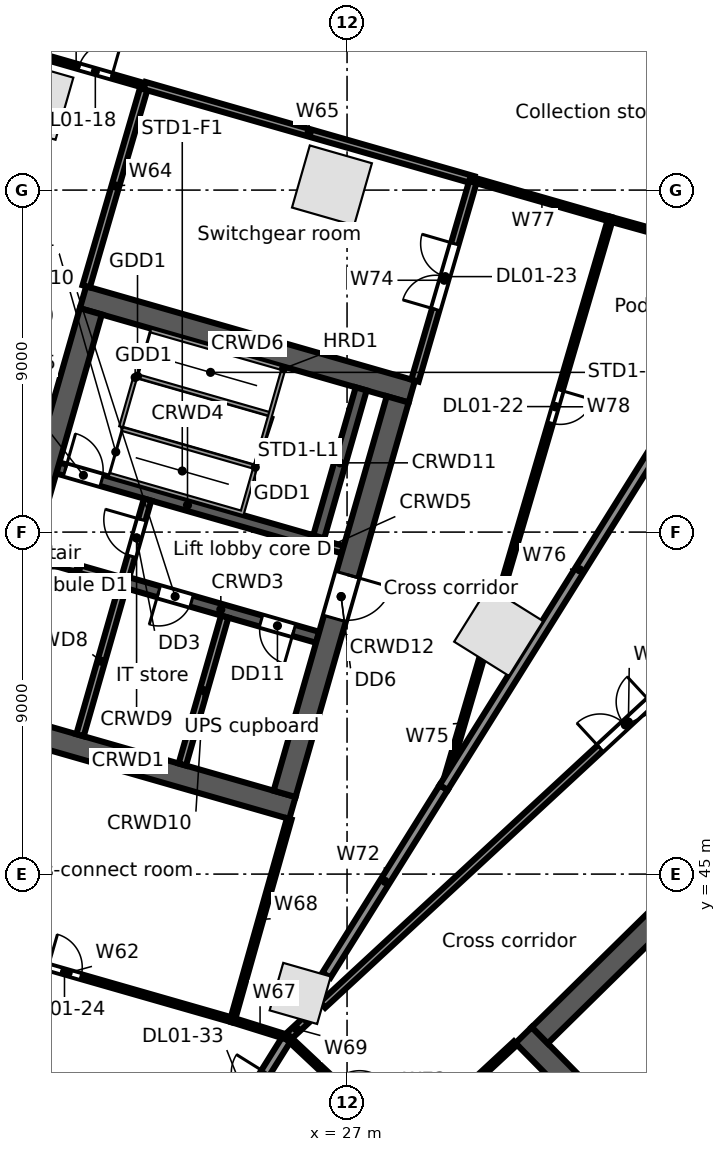
"""IFC4 building model, lengths in metres.
Left out: names, types, materials, properties, quantities, classifications, styles, units other than length and angle.
Written with IfcOpenShell. Run it as: python <this file> out.ifc"""

import sys

from ifc_helpers import new_model, si_unit, direction, frame, frame_2d, origin, origin_2d, place, context, subcontext, project, spatial, rectangle, extrude, element, fill, save


model = new_model("IFC4")
c1 = context("Model", 3, precision=1e-05, world=origin(), true_north=direction((0.0, 1.0)))
c2 = subcontext(c1, "Body", "Model", "MODEL_VIEW")
j1 = project(units=[si_unit("LENGTHUNIT", "METRE"), si_unit("PLANEANGLEUNIT", "RADIAN")], contexts=[c1])
p1 = place(None, origin())
s1 = spatial("IfcSite", under=j1, at=p1, CompositionType="ELEMENT")
p2 = place(p1, origin())
s2 = spatial("IfcBuilding", under=s1, at=p2, CompositionType="ELEMENT")
p3 = place(p2, frame((0.0, 0.0, 11.5)))
s3 = spatial("IfcBuildingStorey", under=s2, at=p3, CompositionType="ELEMENT", Elevation=11.5)
for number, where, z_axis, x_axis in (
    (1, (26.603, 63.124, 0.0), (0.0, 0.0, 1.0), (-0.961, 0.276, 0.0)),
    (2, (18.746, 65.376, 0.0), (0.0, 0.0, 1.0), (-0.961, 0.276, 0.0)),
):
    element("IfcColumn", number, at=place(p3, frame(where, z_axis=z_axis, x_axis=x_axis)), inside=s3, PredefinedType="COLUMN", context=c2, shape_type="SweptSolid", body=[
        extrude(rectangle(XDim=1.7, YDim=1.7, at=origin_2d()), origin(), (0.0, 0.0, 1.0), 5.0),
    ])
p4 = place(p3, frame((25.767, 41.86, 0.0), z_axis=(0.0, 0.0, 1.0), x_axis=(0.961261695938, -0.275637355817, 0.0)))
e3 = element("IfcColumn", 3, at=p4, inside=s3, PredefinedType="COLUMN", context=c2, shape_type="SweptSolid", body=[
    extrude(rectangle(XDim=1.3, YDim=1.3, at=origin_2d()), origin(), (0.0, 0.0, 1.0), 5.0),
])
p5 = place(p3, frame((30.99, 51.386, 0.0), z_axis=(0.0, 0.0, 1.0), x_axis=(0.529919264233, 0.848048096156, 0.0)))
e4 = element("IfcColumn", 4, at=p5, inside=s3, PredefinedType="COLUMN", context=c2, shape_type="SweptSolid", body=[
    extrude(rectangle(XDim=1.7, YDim=1.7, at=origin_2d()), origin(), (0.0, 0.0, 1.0), 5.0),
])
p6 = place(p3, frame((31.646, 40.763, 0.0), z_axis=(0.0, 0.0, 1.0), x_axis=(0.700911255944, -0.713248491965, 0.0)))
e5 = element("IfcWall", 5, at=p6, inside=s3, PredefinedType="SOLIDWALL", context=c2, shape_type="SweptSolid", body=[
    extrude(rectangle(XDim=15.0, YDim=0.6, at=frame_2d((7.5, 0.0))), origin(), (0.0, 0.0, 1.0), 4.65),
])
p7 = place(p6, frame((12.9, 0.0, 0.0)))
e6 = element("IfcOpeningElement", 6, at=p7, cuts=e5, PredefinedType="OPENING", context=c2, shape_type="SweptSolid", body=[
    extrude(rectangle(XDim=1.2, YDim=2.1, at=frame_2d((0.6, 1.05))), frame((0.0, 0.31, 0.0), z_axis=(0.0, -1.0, 0.0), x_axis=(1.0, 0.0, 0.0)), (0.0, 0.0, 1.0), 0.62),
])
p8 = place(p3, frame((32.07, 40.759, 0.0), z_axis=(0.0, 0.0, 1.0), x_axis=(0.713245344712, 0.70091445858, 0.0)))
e7 = element("IfcWall", 7, at=p8, inside=s3, PredefinedType="SOLIDWALL", context=c2, shape_type="SweptSolid", body=[
    extrude(rectangle(XDim=13.8, YDim=0.6, at=frame_2d((6.9, 0.0))), origin(), (0.0, 0.0, 1.0), 4.65),
])
p9 = place(p3, frame((34.593, 38.191, 0.0), z_axis=(0.0, 0.0, 1.0), x_axis=(0.713252216116, 0.700907466222, 0.0)))
e8 = element("IfcWall", 8, at=p9, inside=s3, PredefinedType="SOLIDWALL", context=c2, shape_type="SweptSolid", body=[
    extrude(rectangle(XDim=4.45, YDim=0.2, at=frame_2d((2.225, 0.0))), origin(), (0.0, 0.0, 1.0), 4.65),
])
p10 = place(p3, frame((16.911, 49.221, 0.0), z_axis=(0.0, 0.0, 1.0), x_axis=(0.96126248289, -0.275634611374, 0.0)))
e9 = element("IfcWall", 9, at=p10, inside=s3, PredefinedType="SOLIDWALL", context=c2, shape_type="SweptSolid", body=[
    extrude(rectangle(XDim=9.0, YDim=0.6, at=frame_2d((4.5, 0.0))), origin(), (0.0, 0.0, 1.0), 4.65),
])
p11 = place(p3, frame((18.728, 53.382, 0.0), z_axis=(0.0, 0.0, 1.0), x_axis=(0.961247070632, -0.275688355216, 0.0)))
e10 = element("IfcWall", 10, at=p11, inside=s3, PredefinedType="SOLIDWALL", context=c2, shape_type="SweptSolid", body=[
    extrude(rectangle(XDim=2.5, YDim=0.2, at=frame_2d((1.25, 0.0))), origin(), (0.0, 0.0, 1.0), 4.65),
])
p12 = place(p3, frame((21.131, 52.692, 0.0), z_axis=(0.0, 0.0, 1.0), x_axis=(0.961271492568, -0.275603188616, 0.0)))
e11 = element("IfcWall", 11, at=p12, inside=s3, PredefinedType="SOLIDWALL", context=c2, shape_type="SweptSolid", body=[
    extrude(rectangle(XDim=5.3, YDim=0.3, at=frame_2d((2.65, 0.0))), origin(), (0.0, 0.0, 1.0), 4.65),
])
p13 = place(p12, frame((0.95, 0.0, 0.0)))
e12 = element("IfcOpeningElement", 12, at=p13, cuts=e11, PredefinedType="OPENING", context=c2, shape_type="SweptSolid", body=[
    extrude(rectangle(XDim=0.9, YDim=2.1, at=frame_2d((0.45, 1.05))), frame((0.0, 0.16, 0.0), z_axis=(0.0, -1.0, 0.0), x_axis=(1.0, 0.0, 0.0)), (0.0, 0.0, 1.0), 0.32),
])
p14 = place(p12, frame((3.75, 0.0, 0.0)))
e13 = element("IfcOpeningElement", 13, at=p14, cuts=e11, PredefinedType="OPENING", context=c2, shape_type="SweptSolid", body=[
    extrude(rectangle(XDim=0.9, YDim=2.1, at=frame_2d((0.45, 1.05))), frame((0.0, 0.16, 0.0), z_axis=(0.0, -1.0, 0.0), x_axis=(1.0, 0.0, 0.0)), (0.0, 0.0, 1.0), 0.32),
])
p15 = place(p3, frame((19.389, 55.689, 0.0), z_axis=(0.0, 0.0, 1.0), x_axis=(0.961261397636, -0.275638396117, 0.0)))
e14 = element("IfcWall", 14, at=p15, inside=s3, PredefinedType="SOLIDWALL", context=c2, shape_type="SweptSolid", body=[
    extrude(rectangle(XDim=7.1, YDim=0.3, at=frame_2d((3.55, 0.0))), origin(), (0.0, 0.0, 1.0), 4.65),
])
p16 = place(p15, frame((0.2, 0.0, 0.0)))
e15 = element("IfcOpeningElement", 15, at=p16, cuts=e14, PredefinedType="OPENING", context=c2, shape_type="SweptSolid", body=[
    extrude(rectangle(XDim=1.0, YDim=2.1, at=frame_2d((0.5, 1.05))), frame((0.0, 0.16, 0.0), z_axis=(0.0, -1.0, 0.0), x_axis=(1.0, 0.0, 0.0)), (0.0, 0.0, 1.0), 0.32),
])
p17 = place(p3, frame((26.214, 53.732, 0.0), z_axis=(0.0, 0.0, 1.0), x_axis=(0.96122076476, -0.27578005982, 0.0)))
e16 = element("IfcWall", 16, at=p17, inside=s3, PredefinedType="SOLIDWALL", context=c2, shape_type="SweptSolid", body=[
    extrude(rectangle(XDim=0.7, YDim=0.2, at=frame_2d((0.35, 0.0))), origin(), (0.0, 0.0, 1.0), 4.65),
])
p18 = place(p3, frame((20.053, 60.18, 0.0), z_axis=(0.0, 0.0, 1.0), x_axis=(0.96126248289, -0.275634611374, 0.0)))
e17 = element("IfcWall", 17, at=p18, inside=s3, PredefinedType="SOLIDWALL", context=c2, shape_type="SweptSolid", body=[
    extrude(rectangle(XDim=9.0, YDim=0.6, at=frame_2d((4.5, 0.0))), origin(), (0.0, 0.0, 1.0), 4.65),
])
p19 = place(p3, frame((17.282, 49.427, 0.0), z_axis=(0.0, 0.0, 1.0), x_axis=(0.275631631629, 0.961263337304, 0.0)))
e18 = element("IfcWall", 18, at=p19, inside=s3, PredefinedType="SOLIDWALL", context=c2, shape_type="SweptSolid", body=[
    extrude(rectangle(XDim=10.8, YDim=0.6, at=frame_2d((5.4, 0.0))), origin(), (0.0, 0.0, 1.0), 4.65),
])
p20 = place(p19, frame((4.8, 0.0, 0.0)))
e19 = element("IfcOpeningElement", 19, at=p20, cuts=e18, PredefinedType="OPENING", context=c2, shape_type="SweptSolid", body=[
    extrude(rectangle(XDim=1.2, YDim=2.1, at=frame_2d((0.6, 1.05))), frame((0.0, 0.31, 0.0), z_axis=(0.0, -1.0, 0.0), x_axis=(1.0, 0.0, 0.0)), (0.0, 0.0, 1.0), 0.62),
])
p21 = place(p3, frame((19.973, 48.655, 0.0), z_axis=(0.0, 0.0, 1.0), x_axis=(0.275668441653, 0.961252781674, 0.0)))
e20 = element("IfcWall", 20, at=p21, inside=s3, PredefinedType="SOLIDWALL", context=c2, shape_type="SweptSolid", body=[
    extrude(rectangle(XDim=4.05, YDim=0.2, at=frame_2d((2.025, 0.0))), origin(), (0.0, 0.0, 1.0), 4.65),
])
p22 = place(p3, frame((21.172, 52.837, 0.0), z_axis=(0.0, 0.0, 1.0), x_axis=(0.275657676022, 0.961255868981, 0.0)))
e21 = element("IfcWall", 21, at=p22, inside=s3, PredefinedType="PARTITIONING", context=c2, shape_type="SweptSolid", body=[
    extrude(rectangle(XDim=2.1, YDim=0.2, at=frame_2d((1.05, 0.0))), origin(), (0.0, 0.0, 1.0), 4.65),
])
p23 = place(p22, frame((0.55, 0.0, 0.0)))
e22 = element("IfcOpeningElement", 22, at=p23, cuts=e21, PredefinedType="OPENING", context=c2, shape_type="SweptSolid", body=[
    extrude(rectangle(XDim=1.0, YDim=2.1, at=frame_2d((0.5, 1.05))), frame((0.0, 0.11, 0.0), z_axis=(0.0, -1.0, 0.0), x_axis=(1.0, 0.0, 0.0)), (0.0, 0.0, 1.0), 0.22),
])
p24 = place(p3, frame((22.665, 47.883, 0.0), z_axis=(0.0, 0.0, 1.0), x_axis=(0.275596769212, 0.961273333033, 0.0)))
e23 = element("IfcWall", 23, at=p24, inside=s3, PredefinedType="PARTITIONING", context=c2, shape_type="SweptSolid", body=[
    extrude(rectangle(XDim=4.05, YDim=0.2, at=frame_2d((2.025, 0.0))), origin(), (0.0, 0.0, 1.0), 4.65),
])
p25 = place(p3, frame((26.256, 53.876, 0.0), z_axis=(0.0, 0.0, 1.0), x_axis=(0.275612739511, 0.961268754209, 0.0)))
e24 = element("IfcWall", 24, at=p25, inside=s3, PredefinedType="SOLIDWALL", context=c2, shape_type="SweptSolid", body=[
    extrude(rectangle(XDim=4.05, YDim=0.3, at=frame_2d((2.025, 0.0))), origin(), (0.0, 0.0, 1.0), 4.65),
])
p26 = place(p3, frame((25.356, 47.112, 0.0), z_axis=(0.0, 0.0, 1.0), x_axis=(0.275631631629, 0.961263337304, 0.0)))
e25 = element("IfcWall", 25, at=p26, inside=s3, PredefinedType="SOLIDWALL", context=c2, shape_type="SweptSolid", body=[
    extrude(rectangle(XDim=10.8, YDim=0.6, at=frame_2d((5.4, 0.0))), origin(), (0.0, 0.0, 1.0), 4.65),
])
p27 = place(p26, frame((4.8, 0.0, 0.0)))
e26 = element("IfcOpeningElement", 26, at=p27, cuts=e25, PredefinedType="OPENING", context=c2, shape_type="SweptSolid", body=[
    extrude(rectangle(XDim=1.2, YDim=2.1, at=frame_2d((0.6, 1.05))), frame((0.0, 0.31, 0.0), z_axis=(0.0, -1.0, 0.0), x_axis=(1.0, 0.0, 0.0)), (0.0, 0.0, 1.0), 0.62),
])
p28 = place(p3, frame((15.335, 43.639, 0.0), z_axis=(0.0, 0.0, 1.0), x_axis=(0.961281982754, -0.275566597455, 0.0)))
e27 = element("IfcWall", 27, at=p28, inside=s3, PredefinedType="PARTITIONING", context=c2, shape_type="SweptSolid", body=[
    extrude(rectangle(XDim=9.0, YDim=0.125, at=frame_2d((4.5, 0.0))), origin(), (0.0, 0.0, 1.0), 3.822),
])
p29 = place(p28, frame((3.95, 0.0, 0.0)))
e28 = element("IfcOpeningElement", 28, at=p29, cuts=e27, PredefinedType="OPENING", context=c2, shape_type="SweptSolid", body=[
    extrude(rectangle(XDim=0.9, YDim=2.1, at=frame_2d((0.45, 1.05))), frame((0.0, 0.073, 0.0), z_axis=(0.0, -1.0, 0.0), x_axis=(1.0, 0.0, 0.0)), (0.0, 0.0, 1.0), 0.145),
])
p30 = place(p3, frame((18.069, 66.782, 0.0), z_axis=(0.0, 0.0, 1.0), x_axis=(0.961314848061, -0.275451924837, 0.0)))
e29 = element("IfcWall", 29, at=p30, inside=s3, PredefinedType="PARTITIONING", context=c2, shape_type="SweptSolid", body=[
    extrude(rectangle(XDim=3.75, YDim=0.125, at=frame_2d((1.875, 0.0))), origin(), (0.0, 0.0, 1.0), 3.712),
])
p31 = place(p30, frame((1.95, 0.0, 0.0)))
e30 = element("IfcOpeningElement", 30, at=p31, cuts=e29, PredefinedType="OPENING", context=c2, shape_type="SweptSolid", body=[
    extrude(rectangle(XDim=0.9, YDim=2.1, at=frame_2d((0.45, 1.05))), frame((0.0, 0.073, 0.0), z_axis=(0.0, -1.0, 0.0), x_axis=(1.0, 0.0, 0.0)), (0.0, 0.0, 1.0), 0.145),
])
p32 = place(p3, frame((20.136, 60.468, 0.0), z_axis=(0.0, 0.0, 1.0), x_axis=(0.279630121779, 0.96010780384, 0.0)))
e31 = element("IfcWall", 31, at=p32, inside=s3, PredefinedType="PARTITIONING", context=c2, shape_type="SweptSolid", body=[
    extrude(rectangle(XDim=5.5, YDim=0.2, at=frame_2d((2.75, 0.0))), origin(), (0.0, 0.0, 1.0), 4.018),
])
p33 = place(p3, frame((21.674, 65.749, 0.0), z_axis=(0.0, 0.0, 1.0), x_axis=(0.961259417468, -0.275645301662, 0.0)))
e32 = element("IfcWall", 32, at=p33, inside=s3, PredefinedType="PARTITIONING", context=c2, shape_type="SweptSolid", body=[
    extrude(rectangle(XDim=9.0, YDim=0.2, at=frame_2d((4.5, 0.0))), origin(), (0.0, 0.0, 1.0), 3.822),
])
p34 = place(p3, frame((23.397, 37.442, 0.0), z_axis=(0.0, 0.0, 1.0), x_axis=(0.529805058875, 0.848119448893, 0.0)))
e33 = element("IfcWall", 33, at=p34, inside=s3, PredefinedType="PARTITIONING", context=c2, shape_type="SweptSolid", body=[
    extrude(rectangle(XDim=3.849, YDim=0.25, at=frame_2d((1.924, 0.0))), origin(), (0.0, 0.0, 1.0), 3.712),
])
p35 = place(p34, frame((0.95, 0.0, 0.0)))
e34 = element("IfcOpeningElement", 34, at=p35, cuts=e33, PredefinedType="OPENING", context=c2, shape_type="SweptSolid", body=[
    extrude(rectangle(XDim=1.8, YDim=2.1, at=frame_2d((0.9, 1.05))), frame((0.0, 0.135, 0.0), z_axis=(0.0, -1.0, 0.0), x_axis=(1.0, 0.0, 0.0)), (0.0, 0.0, 1.0), 0.27),
])
p36 = place(p3, frame((23.986, 41.159, 0.0), z_axis=(0.0, 0.0, 1.0), x_axis=(0.954522865266, -0.298137719325, 0.0)))
e35 = element("IfcWall", 35, at=p36, inside=s3, PredefinedType="PARTITIONING", context=c2, shape_type="SweptSolid", body=[
    extrude(rectangle(XDim=1.519, YDim=0.125, at=frame_2d((0.76, 0.0))), origin(), (0.0, 0.0, 1.0), 3.712),
])
p37 = place(p3, frame((23.986, 41.159, 0.0), z_axis=(0.0, 0.0, 1.0), x_axis=(0.271465437068, 0.962448188983, 0.0)))
e36 = element("IfcWall", 36, at=p37, inside=s3, PredefinedType="PARTITIONING", context=c2, shape_type="SweptSolid", body=[
    extrude(rectangle(XDim=5.5, YDim=0.125, at=frame_2d((2.75, 0.0))), origin(), (0.0, 0.0, 1.0), 3.93),
])
p38 = place(p3, frame((25.436, 40.706, 0.0), z_axis=(0.0, 0.0, 1.0), x_axis=(0.733725630695, 0.679445876329, 0.0)))
e37 = element("IfcWall", 37, at=p38, inside=s3, PredefinedType="PARTITIONING", context=c2, shape_type="SweptSolid", body=[
    extrude(rectangle(XDim=0.643, YDim=0.2, at=frame_2d((0.322, 0.0))), origin(), (0.0, 0.0, 1.0), 4.65),
])
p39 = place(p3, frame((25.436, 40.706, 0.0), z_axis=(0.0, 0.0, 1.0), x_axis=(0.729011488135, -0.684501461041, 0.0)))
e38 = element("IfcWall", 38, at=p39, inside=s3, PredefinedType="PARTITIONING", context=c2, shape_type="SweptSolid", body=[
    extrude(rectangle(XDim=4.202, YDim=0.125, at=frame_2d((2.101, 0.0))), origin(), (0.0, 0.0, 1.0), 4.65),
])
p40 = place(p39, frame((1.7, 0.0, 0.0)))
e39 = element("IfcOpeningElement", 39, at=p40, cuts=e38, PredefinedType="OPENING", context=c2, shape_type="SweptSolid", body=[
    extrude(rectangle(XDim=0.9, YDim=2.1, at=frame_2d((0.45, 1.05))), frame((0.0, 0.073, 0.0), z_axis=(0.0, -1.0, 0.0), x_axis=(1.0, 0.0, 0.0)), (0.0, 0.0, 1.0), 0.145),
])
p41 = place(p3, frame((26.356, 41.557, 0.0), z_axis=(0.0, 0.0, 1.0), x_axis=(0.734047402287, 0.679098233834, 0.0)))
e40 = element("IfcWall", 40, at=p41, inside=s3, PredefinedType="PARTITIONING", context=c2, shape_type="SweptSolid", body=[
    extrude(rectangle(XDim=21.926, YDim=0.2, at=frame_2d((10.963, 0.0))), origin(), (0.0, 0.0, 1.0), 3.73),
])
p42 = place(p41, frame((9.95, 0.0, 0.0)))
e41 = element("IfcOpeningElement", 41, at=p42, cuts=e40, PredefinedType="OPENING", context=c2, shape_type="SweptSolid", body=[
    extrude(rectangle(XDim=1.8, YDim=2.1, at=frame_2d((0.9, 1.05))), frame((0.0, 0.11, 0.0), z_axis=(0.0, -1.0, 0.0), x_axis=(1.0, 0.0, 0.0)), (0.0, 0.0, 1.0), 0.22),
])
p43 = place(p3, frame((26.456, 42.338, 0.0), z_axis=(0.0, 0.0, 1.0), x_axis=(0.529836963461, 0.848099517834, 0.0)))
e42 = element("IfcWall", 42, at=p43, inside=s3, PredefinedType="PARTITIONING", context=c2, shape_type="SweptSolid", body=[
    extrude(rectangle(XDim=5.826, YDim=0.25, at=frame_2d((2.913, 0.0))), origin(), (0.0, 0.0, 1.0), 3.712),
])
p44 = place(p3, frame((28.499, 37.83, 0.0), z_axis=(0.0, 0.0, 1.0), x_axis=(0.732973836409, 0.680256830278, 0.0)))
e43 = element("IfcWall", 43, at=p44, inside=s3, PredefinedType="PARTITIONING", context=c2, shape_type="SweptSolid", body=[
    extrude(rectangle(XDim=4.001, YDim=0.125, at=frame_2d((2.0, 0.0))), origin(), (0.0, 0.0, 1.0), 3.93),
])
p45 = place(p3, frame((28.787, 57.987, 0.0), z_axis=(0.0, 0.0, 1.0), x_axis=(0.279752860161, 0.960072047938, 0.0)))
e44 = element("IfcWall", 44, at=p45, inside=s3, PredefinedType="PARTITIONING", context=c2, shape_type="SweptSolid", body=[
    extrude(rectangle(XDim=5.501, YDim=0.2, at=frame_2d((2.75, 0.0))), origin(), (0.0, 0.0, 1.0), 3.922),
])
p46 = place(p45, frame((1.95, 0.0, 0.0)))
e45 = element("IfcOpeningElement", 45, at=p46, cuts=e44, PredefinedType="OPENING", context=c2, shape_type="SweptSolid", body=[
    extrude(rectangle(XDim=1.8, YDim=2.1, at=frame_2d((0.9, 1.05))), frame((0.0, 0.11, 0.0), z_axis=(0.0, -1.0, 0.0), x_axis=(1.0, 0.0, 0.0)), (0.0, 0.0, 1.0), 0.22),
])
p47 = place(p3, frame((29.543, 47.279, 0.0), z_axis=(0.0, 0.0, 1.0), x_axis=(0.28156355079, 0.959542582102, 0.0)))
e46 = element("IfcWall", 46, at=p47, inside=s3, PredefinedType="PARTITIONING", context=c2, shape_type="SweptSolid", body=[
    extrude(rectangle(XDim=3.531, YDim=0.125, at=frame_2d((1.765, 0.0))), origin(), (0.0, 0.0, 1.0), 3.712),
])
p48 = place(p3, frame((29.543, 47.279, 0.0), z_axis=(0.0, 0.0, 1.0), x_axis=(0.529929076845, 0.848041964477, 0.0)))
e47 = element("IfcWall", 47, at=p48, inside=s3, PredefinedType="PARTITIONING", context=c2, shape_type="SweptSolid", body=[
    extrude(rectangle(XDim=13.507, YDim=0.25, at=frame_2d((6.754, 0.0))), origin(), (0.0, 0.0, 1.0), 3.73),
])
p49 = place(p3, frame((30.326, 63.268, 0.0), z_axis=(0.0, 0.0, 1.0), x_axis=(0.96120880595, -0.275821738383, 0.0)))
e48 = element("IfcWall", 48, at=p49, inside=s3, PredefinedType="PARTITIONING", context=c2, shape_type="SweptSolid", body=[
    extrude(rectangle(XDim=3.75, YDim=0.125, at=frame_2d((1.875, 0.0))), origin(), (0.0, 0.0, 1.0), 4.65),
])
p50 = place(p3, frame((31.034, 52.361, 0.0), z_axis=(0.0, 0.0, 1.0), x_axis=(0.281471237406, 0.959569665273, 0.0)))
e49 = element("IfcWall", 49, at=p50, inside=s3, PredefinedType="PARTITIONING", context=c2, shape_type="SweptSolid", body=[
    extrude(rectangle(XDim=10.289, YDim=0.125, at=frame_2d((5.145, 0.0))), origin(), (0.0, 0.0, 1.0), 3.922),
])
p51 = place(p50, frame((4.7, 0.0, 0.0)))
e50 = element("IfcOpeningElement", 50, at=p51, cuts=e49, PredefinedType="OPENING", context=c2, shape_type="SweptSolid", body=[
    extrude(rectangle(XDim=0.9, YDim=2.1, at=frame_2d((0.45, 1.05))), frame((0.0, 0.073, 0.0), z_axis=(0.0, -1.0, 0.0), x_axis=(1.0, 0.0, 0.0)), (0.0, 0.0, 1.0), 0.145),
])
p52 = place(p3, frame((33.93, 62.234, 0.0), z_axis=(0.0, 0.0, 1.0), x_axis=(0.963433299433, -0.267948274007, 0.0)))
e51 = element("IfcWall", 51, at=p52, inside=s3, PredefinedType="PARTITIONING", context=c2, shape_type="SweptSolid", body=[
    extrude(rectangle(XDim=4.385, YDim=0.125, at=frame_2d((2.192, 0.0))), origin(), (0.0, 0.0, 1.0), 4.018),
])
p53 = place(p16, origin())
e52 = element("IfcDoor", 52, at=p53, inside=s3, OperationType="SINGLE_SWING_LEFT", PredefinedType="DOOR", context=c2, shape_type="SweptSolid", body=[
    extrude(rectangle(XDim=1.0, YDim=2.1, at=frame_2d((0.5, 1.05))), frame((0.0, 0.025, 0.0), z_axis=(0.0, -1.0, 0.0), x_axis=(1.0, 0.0, 0.0)), (0.0, 0.0, 1.0), 0.05),
])
fill(e15, e52)
p54 = place(p23, origin())
e53 = element("IfcDoor", 53, at=p54, inside=s3, OperationType="SINGLE_SWING_RIGHT", PredefinedType="DOOR", context=c2, shape_type="SweptSolid", body=[
    extrude(rectangle(XDim=1.0, YDim=2.1, at=frame_2d((0.5, 1.05))), frame((0.0, 0.025, 0.0), z_axis=(0.0, -1.0, 0.0), x_axis=(1.0, 0.0, 0.0)), (0.0, 0.0, 1.0), 0.05),
])
fill(e22, e53)
p55 = place(p27, frame((1.2, 0.0, 0.0), z_axis=(0.0, 0.0, 1.0), x_axis=(-1.0, 0.0, 0.0)))
e54 = element("IfcDoor", 54, at=p55, inside=s3, OperationType="SINGLE_SWING_LEFT", PredefinedType="DOOR", context=c2, shape_type="SweptSolid", body=[
    extrude(rectangle(XDim=1.2, YDim=2.1, at=frame_2d((0.6, 1.05))), frame((0.0, 0.025, 0.0), z_axis=(0.0, -1.0, 0.0), x_axis=(1.0, 0.0, 0.0)), (0.0, 0.0, 1.0), 0.05),
])
fill(e26, e54)
p56 = place(p13, frame((0.9, 0.0, 0.0), z_axis=(0.0, 0.0, 1.0), x_axis=(-1.0, 0.0, 0.0)))
e55 = element("IfcDoor", 55, at=p56, inside=s3, OperationType="SINGLE_SWING_RIGHT", PredefinedType="DOOR", context=c2, shape_type="SweptSolid", body=[
    extrude(rectangle(XDim=0.9, YDim=2.1, at=frame_2d((0.45, 1.05))), frame((0.0, 0.025, 0.0), z_axis=(0.0, -1.0, 0.0), x_axis=(1.0, 0.0, 0.0)), (0.0, 0.0, 1.0), 0.05),
])
fill(e12, e55)
p57 = place(p14, frame((0.9, 0.0, 0.0), z_axis=(0.0, 0.0, 1.0), x_axis=(-1.0, 0.0, 0.0)))
e56 = element("IfcDoor", 56, at=p57, inside=s3, OperationType="SINGLE_SWING_LEFT", PredefinedType="DOOR", context=c2, shape_type="SweptSolid", body=[
    extrude(rectangle(XDim=0.9, YDim=2.1, at=frame_2d((0.45, 1.05))), frame((0.0, 0.025, 0.0), z_axis=(0.0, -1.0, 0.0), x_axis=(1.0, 0.0, 0.0)), (0.0, 0.0, 1.0), 0.05),
])
fill(e13, e56)
p58 = place(p31, origin())
e57 = element("IfcDoor", 57, at=p58, inside=s3, OperationType="SINGLE_SWING_RIGHT", PredefinedType="DOOR", context=c2, shape_type="SweptSolid", body=[
    extrude(rectangle(XDim=0.9, YDim=2.1, at=frame_2d((0.45, 1.05))), frame((0.0, 0.025, 0.0), z_axis=(0.0, -1.0, 0.0), x_axis=(1.0, 0.0, 0.0)), (0.0, 0.0, 1.0), 0.05),
])
fill(e30, e57)
p59 = place(p51, frame((0.9, 0.0, 0.0), z_axis=(0.0, 0.0, 1.0), x_axis=(-1.0, 0.0, 0.0)))
e58 = element("IfcDoor", 58, at=p59, inside=s3, OperationType="SINGLE_SWING_LEFT", PredefinedType="DOOR", context=c2, shape_type="SweptSolid", body=[
    extrude(rectangle(XDim=0.9, YDim=2.1, at=frame_2d((0.45, 1.05))), frame((0.0, 0.025, 0.0), z_axis=(0.0, -1.0, 0.0), x_axis=(1.0, 0.0, 0.0)), (0.0, 0.0, 1.0), 0.05),
])
fill(e50, e58)
p60 = place(p46, origin())
e59 = element("IfcDoor", 59, at=p60, inside=s3, OperationType="DOUBLE_DOOR_SINGLE_SWING", PredefinedType="DOOR", context=c2, shape_type="SweptSolid", body=[
    extrude(rectangle(XDim=1.8, YDim=2.1, at=frame_2d((0.9, 1.05))), frame((0.0, 0.025, 0.0), z_axis=(0.0, -1.0, 0.0), x_axis=(1.0, 0.0, 0.0)), (0.0, 0.0, 1.0), 0.05),
])
fill(e45, e59)
p61 = place(p29, origin())
e60 = element("IfcDoor", 60, at=p61, inside=s3, OperationType="SINGLE_SWING_LEFT", PredefinedType="DOOR", context=c2, shape_type="SweptSolid", body=[
    extrude(rectangle(XDim=0.9, YDim=2.1, at=frame_2d((0.45, 1.05))), frame((0.0, 0.025, 0.0), z_axis=(0.0, -1.0, 0.0), x_axis=(1.0, 0.0, 0.0)), (0.0, 0.0, 1.0), 0.05),
])
fill(e28, e60)
p62 = place(p42, origin())
e61 = element("IfcDoor", 61, at=p62, inside=s3, OperationType="DOUBLE_DOOR_SINGLE_SWING", PredefinedType="DOOR", context=c2, shape_type="SweptSolid", body=[
    extrude(rectangle(XDim=1.8, YDim=2.1, at=frame_2d((0.9, 1.05))), frame((0.0, 0.025, 0.0), z_axis=(0.0, -1.0, 0.0), x_axis=(1.0, 0.0, 0.0)), (0.0, 0.0, 1.0), 0.05),
])
fill(e41, e61)
save(model, sys.argv[1])
